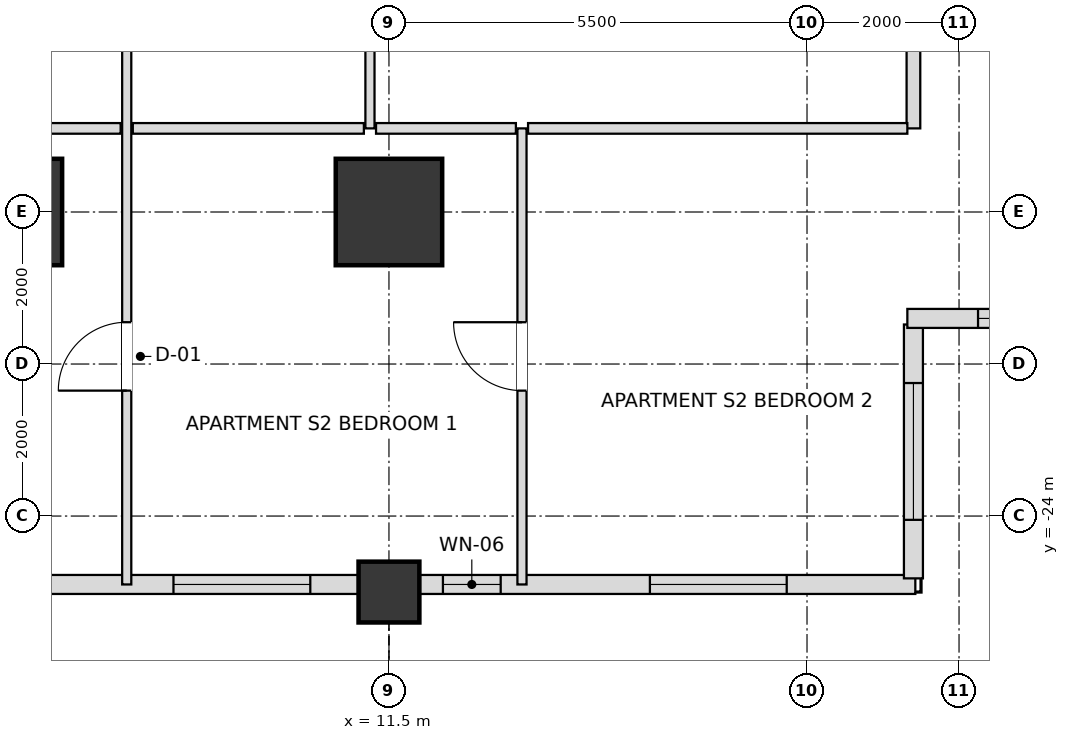
"""IFC4 building model, lengths in metres.
Left out: names, types, materials, properties, quantities, classifications, styles, units other than length and angle.
Written with IfcOpenShell. Run it as: python <this file> out.ifc"""

import sys

from ifc_helpers import new_model, si_unit, direction, frame, frame_2d, origin, origin_2d, place, context, subcontext, project, spatial, rectangle, extrude, element, fill, save


model = new_model("IFC4")
c1 = context("Model", 3, precision=1e-05, world=origin(), true_north=direction((0.0, 1.0)))
c2 = subcontext(c1, "Body", "Model", "MODEL_VIEW")
j1 = project(units=[si_unit("LENGTHUNIT", "METRE"), si_unit("PLANEANGLEUNIT", "RADIAN")], contexts=[c1])
p1 = place(None, origin())
s1 = spatial("IfcSite", under=j1, at=p1, CompositionType="ELEMENT")
p2 = place(p1, origin())
s2 = spatial("IfcBuilding", under=s1, at=p2, CompositionType="ELEMENT")
p3 = place(p2, frame((0.0, 0.0, 50.4)))
s3 = spatial("IfcBuildingStorey", under=s2, at=p3, CompositionType="ELEMENT", Elevation=50.4)
for number, where, z_axis, x_axis in (
    (1, (6.5, -20.0, 0.0), (0.0, 0.0, 1.0), (1.0, 0.0, 0.0)),
    (2, (11.5, -20.0, 0.0), (0.0, 0.0, 1.0), (1.0, 0.0, 0.0)),
):
    element("IfcColumn", number, at=place(p3, frame(where, z_axis=z_axis, x_axis=x_axis)), inside=s3, PredefinedType="USERDEFINED", context=c2, shape_type="SweptSolid", body=[
        extrude(rectangle(XDim=1.4, YDim=1.4, at=origin_2d()), origin(), (0.0, 0.0, 1.0), 3.6),
    ])
p4 = place(p3, frame((11.5, -25.0, 0.0), z_axis=(0.0, 0.0, 1.0), x_axis=(1.0, 0.0, 0.0)))
e3 = element("IfcColumn", 3, at=p4, inside=s3, PredefinedType="COLUMN", context=c2, shape_type="SweptSolid", body=[
    extrude(rectangle(XDim=0.8, YDim=0.8, at=origin_2d()), origin(), (0.0, 0.0, 1.0), 3.6),
])
p5 = place(p3, frame((6.895, -24.9, 0.0), z_axis=(0.0, 0.0, 1.0), x_axis=(1.0, 0.0, 0.0)))
e4 = element("IfcWall", 4, at=p5, inside=s3, PredefinedType="SOLIDWALL", context=c2, shape_type="SweptSolid", body=[
    extrude(rectangle(XDim=4.21, YDim=0.25, at=frame_2d((2.105, 0.0))), origin(), (0.0, 0.0, 1.0), 2.736),
])
p6 = place(p5, frame((1.77, 0.0, 0.72)))
e5 = element("IfcOpeningElement", 5, at=p6, cuts=e4, PredefinedType="OPENING", context=c2, shape_type="SweptSolid", body=[
    extrude(rectangle(XDim=1.8, YDim=1.68, at=frame_2d((0.9, 0.84))), frame((0.0, 0.135, 0.0), z_axis=(0.0, -1.0, 0.0), x_axis=(1.0, 0.0, 0.0)), (0.0, 0.0, 1.0), 0.27),
])
p7 = place(p3, frame((11.895, -24.9, 0.0), z_axis=(0.0, 0.0, 1.0), x_axis=(1.0, 0.0, 0.0)))
e6 = element("IfcWall", 6, at=p7, inside=s3, PredefinedType="SOLIDWALL", context=c2, shape_type="SweptSolid", body=[
    extrude(rectangle(XDim=6.53, YDim=0.25, at=frame_2d((3.265, 0.0))), origin(), (0.0, 0.0, 1.0), 2.736),
])
p8 = place(p7, frame((0.315, 0.0, 0.72)))
e7 = element("IfcOpeningElement", 7, at=p8, cuts=e6, PredefinedType="OPENING", context=c2, shape_type="SweptSolid", body=[
    extrude(rectangle(XDim=0.76, YDim=1.68, at=frame_2d((0.38, 0.84))), frame((0.0, 0.135, 0.0), z_axis=(0.0, -1.0, 0.0), x_axis=(1.0, 0.0, 0.0)), (0.0, 0.0, 1.0), 0.27),
])
p9 = place(p7, frame((3.038, 0.0, 0.72)))
e8 = element("IfcOpeningElement", 8, at=p9, cuts=e6, PredefinedType="OPENING", context=c2, shape_type="SweptSolid", body=[
    extrude(rectangle(XDim=1.8, YDim=1.68, at=frame_2d((0.9, 0.84))), frame((0.0, 0.135, 0.0), z_axis=(0.0, -1.0, 0.0), x_axis=(1.0, 0.0, 0.0)), (0.0, 0.0, 1.0), 0.27),
])
p10 = place(p3, frame((18.4, -24.82, 0.0), z_axis=(0.0, 0.0, 1.0), x_axis=(0.0, 1.0, 0.0)))
e9 = element("IfcWall", 9, at=p10, inside=s3, PredefinedType="SOLIDWALL", context=c2, shape_type="SweptSolid", body=[
    extrude(rectangle(XDim=3.34, YDim=0.25, at=frame_2d((1.67, 0.0))), origin(), (0.0, 0.0, 1.0), 2.736),
])
p11 = place(p10, frame((0.77, 0.0, 0.72)))
e10 = element("IfcOpeningElement", 10, at=p11, cuts=e9, PredefinedType="OPENING", context=c2, shape_type="SweptSolid", body=[
    extrude(rectangle(XDim=1.8, YDim=1.68, at=frame_2d((0.9, 0.84))), frame((0.0, 0.135, 0.0), z_axis=(0.0, -1.0, 0.0), x_axis=(1.0, 0.0, 0.0)), (0.0, 0.0, 1.0), 0.27),
])
p12 = place(p3, frame((18.32, -21.4, 0.0), z_axis=(0.0, 0.0, 1.0), x_axis=(1.0, 0.0, 0.0)))
e11 = element("IfcWall", 11, at=p12, inside=s3, PredefinedType="SOLIDWALL", context=c2, shape_type="SweptSolid", body=[
    extrude(rectangle(XDim=3.66, YDim=0.25, at=frame_2d((1.83, 0.0))), origin(), (0.0, 0.0, 1.0), 2.736),
])
p13 = place(p12, frame((0.93, 0.0, 0.72)))
e12 = element("IfcOpeningElement", 12, at=p13, cuts=e11, PredefinedType="OPENING", context=c2, shape_type="SweptSolid", body=[
    extrude(rectangle(XDim=1.8, YDim=1.68, at=frame_2d((0.9, 0.84))), frame((0.0, 0.135, 0.0), z_axis=(0.0, -1.0, 0.0), x_axis=(1.0, 0.0, 0.0)), (0.0, 0.0, 1.0), 0.27),
])
p14 = place(p3, frame((8.05, -24.9, 0.0), z_axis=(0.0, 0.0, 1.0), x_axis=(0.0, 1.0, 0.0)))
e13 = element("IfcWall", 13, at=p14, inside=s3, PredefinedType="PARTITIONING", context=c2, shape_type="SweptSolid", body=[
    extrude(rectangle(XDim=15.6, YDim=0.12, at=frame_2d((7.8, 0.0))), origin(), (0.0, 0.0, 1.0), 2.816),
])
p15 = place(p14, frame((10.325, 0.0, 0.0)))
e14 = element("IfcOpeningElement", 14, at=p15, cuts=e13, PredefinedType="OPENING", context=c2, shape_type="SweptSolid", body=[
    extrude(rectangle(XDim=0.95, YDim=2.1, at=frame_2d((0.475, 1.05))), frame((0.0, 0.07, 0.0), z_axis=(0.0, -1.0, 0.0), x_axis=(1.0, 0.0, 0.0)), (0.0, 0.0, 1.0), 0.14),
])
p16 = place(p14, frame((2.55, 0.0, 0.0)))
e15 = element("IfcOpeningElement", 15, at=p16, cuts=e13, PredefinedType="OPENING", context=c2, shape_type="SweptSolid", body=[
    extrude(rectangle(XDim=0.9, YDim=2.1, at=frame_2d((0.45, 1.05))), frame((0.0, 0.07, 0.0), z_axis=(0.0, -1.0, 0.0), x_axis=(1.0, 0.0, 0.0)), (0.0, 0.0, 1.0), 0.14),
])
p17 = place(p3, frame((11.25, -18.9, 0.0), z_axis=(0.0, 0.0, 1.0), x_axis=(0.0, 1.0, 0.0)))
e16 = element("IfcWall", 16, at=p17, inside=s3, PredefinedType="PARTITIONING", context=c2, shape_type="SweptSolid", body=[
    extrude(rectangle(XDim=9.6, YDim=0.12, at=frame_2d((4.8, 0.0))), origin(), (0.0, 0.0, 1.0), 2.736),
])
p18 = place(p17, frame((4.325, 0.0, 0.0)))
e17 = element("IfcOpeningElement", 17, at=p18, cuts=e16, PredefinedType="OPENING", context=c2, shape_type="SweptSolid", body=[
    extrude(rectangle(XDim=0.95, YDim=2.1, at=frame_2d((0.475, 1.05))), frame((0.0, 0.07, 0.0), z_axis=(0.0, -1.0, 0.0), x_axis=(1.0, 0.0, 0.0)), (0.0, 0.0, 1.0), 0.14),
])
p19 = place(p3, frame((13.25, -24.9, 0.0), z_axis=(0.0, 0.0, 1.0), x_axis=(0.0, 1.0, 0.0)))
e18 = element("IfcWall", 18, at=p19, inside=s3, PredefinedType="PARTITIONING", context=c2, shape_type="SweptSolid", body=[
    extrude(rectangle(XDim=6.0, YDim=0.12, at=frame_2d((3.0, 0.0))), origin(), (0.0, 0.0, 1.0), 2.736),
])
p20 = place(p19, frame((2.55, 0.0, 0.0)))
e19 = element("IfcOpeningElement", 19, at=p20, cuts=e18, PredefinedType="OPENING", context=c2, shape_type="SweptSolid", body=[
    extrude(rectangle(XDim=0.9, YDim=2.1, at=frame_2d((0.45, 1.05))), frame((0.0, 0.07, 0.0), z_axis=(0.0, -1.0, 0.0), x_axis=(1.0, 0.0, 0.0)), (0.0, 0.0, 1.0), 0.14),
])
p21 = place(p3, frame((18.4, -18.9, 0.0), z_axis=(0.0, 0.0, 1.0), x_axis=(0.0, 1.0, 0.0)))
e20 = element("IfcWall", 20, at=p21, inside=s3, PredefinedType="PARTITIONING", context=c2, shape_type="SweptSolid", body=[
    extrude(rectangle(XDim=9.6, YDim=0.18, at=frame_2d((4.8, 0.0))), origin(), (0.0, 0.0, 1.0), 2.736),
])
p22 = place(p3, frame((3.93, -18.9, 0.0), z_axis=(0.0, 0.0, 1.0), x_axis=(1.0, 0.0, 0.0)))
e21 = element("IfcWall", 21, at=p22, inside=s3, PredefinedType="PARTITIONING", context=c2, shape_type="SweptSolid", body=[
    extrude(rectangle(XDim=4.04, YDim=0.14, at=frame_2d((2.02, 0.0))), origin(), (0.0, 0.0, 1.0), 2.816),
])
p23 = place(p22, frame((0.638, 0.0, 0.0)))
e22 = element("IfcOpeningElement", 22, at=p23, cuts=e21, PredefinedType="OPENING", context=c2, shape_type="SweptSolid", body=[
    extrude(rectangle(XDim=0.95, YDim=2.1, at=frame_2d((0.475, 1.05))), frame((0.0, 0.08, 0.0), z_axis=(0.0, -1.0, 0.0), x_axis=(1.0, 0.0, 0.0)), (0.0, 0.0, 1.0), 0.16),
])
p24 = place(p3, frame((8.13, -18.9, 0.0), z_axis=(0.0, 0.0, 1.0), x_axis=(1.0, 0.0, 0.0)))
e23 = element("IfcWall", 23, at=p24, inside=s3, PredefinedType="PARTITIONING", context=c2, shape_type="SweptSolid", body=[
    extrude(rectangle(XDim=3.04, YDim=0.14, at=frame_2d((1.52, 0.0))), origin(), (0.0, 0.0, 1.0), 3.38),
])
p25 = place(p3, frame((11.33, -18.9, 0.0), z_axis=(0.0, 0.0, 1.0), x_axis=(1.0, 0.0, 0.0)))
e24 = element("IfcWall", 24, at=p25, inside=s3, PredefinedType="PARTITIONING", context=c2, shape_type="SweptSolid", body=[
    extrude(rectangle(XDim=1.84, YDim=0.14, at=frame_2d((0.92, 0.0))), origin(), (0.0, 0.0, 1.0), 2.736),
])
p26 = place(p3, frame((13.33, -18.9, 0.0), z_axis=(0.0, 0.0, 1.0), x_axis=(1.0, 0.0, 0.0)))
e25 = element("IfcWall", 25, at=p26, inside=s3, PredefinedType="PARTITIONING", context=c2, shape_type="SweptSolid", body=[
    extrude(rectangle(XDim=4.99, YDim=0.14, at=frame_2d((2.495, 0.0))), origin(), (0.0, 0.0, 1.0), 2.736),
])
p27 = place(p6, origin())
e26 = element("IfcWindow", 26, at=p27, inside=s3, PartitioningType="SINGLE_PANEL", PredefinedType="WINDOW", context=c2, shape_type="SweptSolid", body=[
    extrude(rectangle(XDim=1.8, YDim=1.68, at=frame_2d((0.9, 0.84))), frame((0.0, 0.03, 0.0), z_axis=(0.0, -1.0, 0.0), x_axis=(1.0, 0.0, 0.0)), (0.0, 0.0, 1.0), 0.06),
])
fill(e5, e26)
p28 = place(p8, origin())
e27 = element("IfcWindow", 27, at=p28, inside=s3, PartitioningType="SINGLE_PANEL", PredefinedType="WINDOW", context=c2, shape_type="SweptSolid", body=[
    extrude(rectangle(XDim=0.76, YDim=1.68, at=frame_2d((0.38, 0.84))), frame((0.0, 0.03, 0.0), z_axis=(0.0, -1.0, 0.0), x_axis=(1.0, 0.0, 0.0)), (0.0, 0.0, 1.0), 0.06),
])
fill(e7, e27)
p29 = place(p9, origin())
e28 = element("IfcWindow", 28, at=p29, inside=s3, PartitioningType="SINGLE_PANEL", PredefinedType="WINDOW", context=c2, shape_type="SweptSolid", body=[
    extrude(rectangle(XDim=1.8, YDim=1.68, at=frame_2d((0.9, 0.84))), frame((0.0, 0.03, 0.0), z_axis=(0.0, -1.0, 0.0), x_axis=(1.0, 0.0, 0.0)), (0.0, 0.0, 1.0), 0.06),
])
fill(e8, e28)
p30 = place(p11, origin())
e29 = element("IfcWindow", 29, at=p30, inside=s3, PartitioningType="SINGLE_PANEL", PredefinedType="WINDOW", context=c2, shape_type="SweptSolid", body=[
    extrude(rectangle(XDim=1.8, YDim=1.68, at=frame_2d((0.9, 0.84))), frame((0.0, 0.03, 0.0), z_axis=(0.0, -1.0, 0.0), x_axis=(1.0, 0.0, 0.0)), (0.0, 0.0, 1.0), 0.06),
])
fill(e10, e29)
p31 = place(p13, origin())
e30 = element("IfcWindow", 30, at=p31, inside=s3, PartitioningType="SINGLE_PANEL", PredefinedType="WINDOW", context=c2, shape_type="SweptSolid", body=[
    extrude(rectangle(XDim=1.8, YDim=1.68, at=frame_2d((0.9, 0.84))), frame((0.0, 0.03, 0.0), z_axis=(0.0, -1.0, 0.0), x_axis=(1.0, 0.0, 0.0)), (0.0, 0.0, 1.0), 0.06),
])
fill(e12, e30)
p32 = place(p16, origin())
e31 = element("IfcDoor", 31, at=p32, inside=s3, OperationType="SINGLE_SWING_LEFT", PredefinedType="DOOR", context=c2, shape_type="SweptSolid", body=[
    extrude(rectangle(XDim=0.9, YDim=2.1, at=frame_2d((0.45, 1.05))), frame((0.0, 0.025, 0.0), z_axis=(0.0, -1.0, 0.0), x_axis=(1.0, 0.0, 0.0)), (0.0, 0.0, 1.0), 0.05),
])
fill(e15, e31)
p33 = place(p20, origin())
e32 = element("IfcDoor", 32, at=p33, inside=s3, OperationType="SINGLE_SWING_RIGHT", PredefinedType="DOOR", context=c2, shape_type="SweptSolid", body=[
    extrude(rectangle(XDim=0.9, YDim=2.1, at=frame_2d((0.45, 1.05))), frame((0.0, 0.025, 0.0), z_axis=(0.0, -1.0, 0.0), x_axis=(1.0, 0.0, 0.0)), (0.0, 0.0, 1.0), 0.05),
])
fill(e19, e32)
save(model, sys.argv[1])
